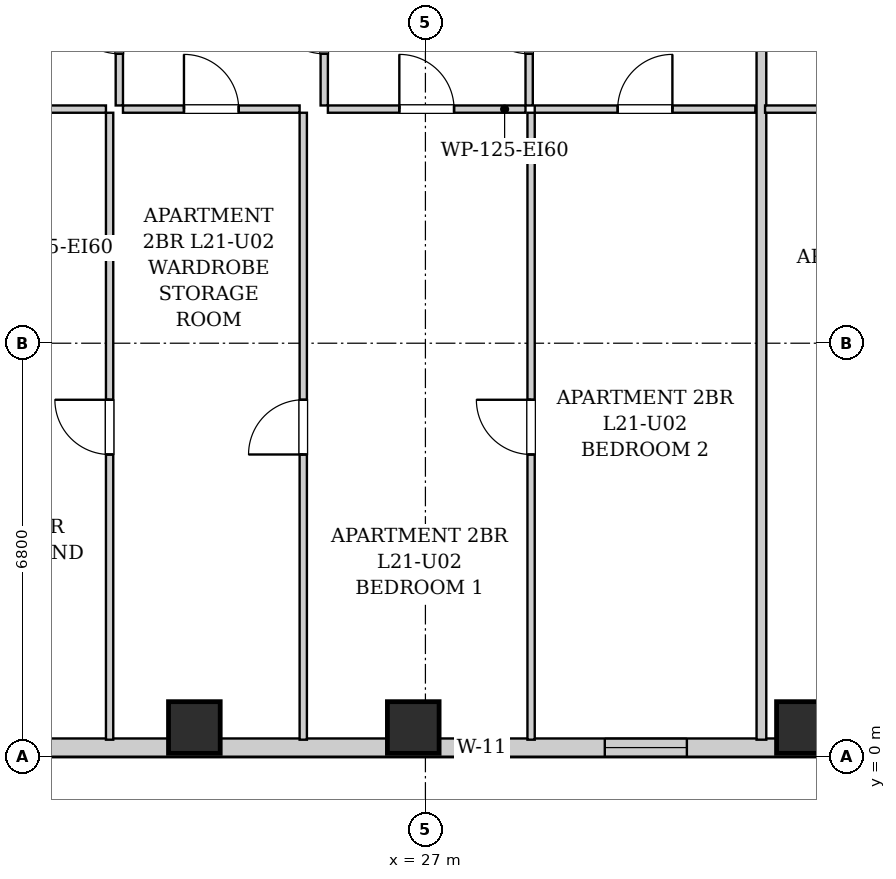
"""IFC4 building model, lengths in metres.
Left out: names, types, materials, properties, quantities, classifications, styles, units other than length and angle.
Written with IfcOpenShell. Run it as: python <this file> out.ifc"""

import sys

from ifc_helpers import new_model, si_unit, direction, frame, frame_2d, origin, origin_2d, place, context, subcontext, project, spatial, rectangle, extrude, element, fill, save


model = new_model("IFC4")
c1 = context("Model", 3, precision=1e-05, world=origin(), true_north=direction((0.0, 1.0)))
c2 = subcontext(c1, "Body", "Model", "MODEL_VIEW")
j1 = project(units=[si_unit("LENGTHUNIT", "METRE"), si_unit("PLANEANGLEUNIT", "RADIAN")], contexts=[c1])
p1 = place(None, origin())
s1 = spatial("IfcSite", under=j1, at=p1, CompositionType="ELEMENT")
p2 = place(p1, origin())
s2 = spatial("IfcBuilding", under=s1, at=p2, CompositionType="ELEMENT")
p3 = place(p2, frame((0.0, 0.0, 78.3)))
s3 = spatial("IfcBuildingStorey", under=s2, at=p3, CompositionType="ELEMENT", Elevation=78.3)
for number, where, z_axis, x_axis in (
    (1, (23.2, 0.48, 0.0), (0.0, 0.0, 1.0), (1.0, 0.0, 0.0)),
    (2, (26.8, 0.48, 0.0), (0.0, 0.0, 1.0), (1.0, 0.0, 0.0)),
    (3, (33.2, 0.48, 0.0), (0.0, 0.0, 1.0), (1.0, 0.0, 0.0)),
):
    element("IfcColumn", number, at=place(p3, frame(where, z_axis=z_axis, x_axis=x_axis)), inside=s3, PredefinedType="COLUMN", context=c2, shape_type="SweptSolid", body=[
        extrude(rectangle(XDim=0.85, YDim=0.85, at=origin_2d()), origin(), (0.0, 0.0, 1.0), 3.2),
    ])
p4 = place(p3, frame((40.9, 0.15, 0.0), z_axis=(0.0, 0.0, 1.0), x_axis=(-1.0, 0.0, 0.0)))
e4 = element("IfcWall", 4, at=p4, inside=s3, PredefinedType="SOLIDWALL", context=c2, shape_type="SweptSolid", body=[
    extrude(rectangle(XDim=23.7, YDim=0.3, at=frame_2d((11.85, 0.0))), origin(), (0.0, 0.0, 1.0), 2.94),
])
p5 = place(p4, frame((20.625, 0.0, 0.55)))
e5 = element("IfcOpeningElement", 5, at=p5, cuts=e4, PredefinedType="OPENING", context=c2, shape_type="SweptSolid", body=[
    extrude(rectangle(XDim=1.35, YDim=1.2, at=frame_2d((0.675, 0.6))), frame((0.0, 0.16, 0.0), z_axis=(0.0, -1.0, 0.0), x_axis=(1.0, 0.0, 0.0)), (0.0, 0.0, 1.0), 0.32),
])
p6 = place(p4, frame((12.55, 0.0, 0.55)))
e6 = element("IfcOpeningElement", 6, at=p6, cuts=e4, PredefinedType="OPENING", context=c2, shape_type="SweptSolid", body=[
    extrude(rectangle(XDim=0.85, YDim=1.2, at=frame_2d((0.425, 0.6))), frame((0.0, 0.16, 0.0), z_axis=(0.0, -1.0, 0.0), x_axis=(1.0, 0.0, 0.0)), (0.0, 0.0, 1.0), 0.32),
])
p7 = place(p4, frame((9.6, 0.0, 0.55)))
e7 = element("IfcOpeningElement", 7, at=p7, cuts=e4, PredefinedType="OPENING", context=c2, shape_type="SweptSolid", body=[
    extrude(rectangle(XDim=1.35, YDim=1.2, at=frame_2d((0.675, 0.6))), frame((0.0, 0.16, 0.0), z_axis=(0.0, -1.0, 0.0), x_axis=(1.0, 0.0, 0.0)), (0.0, 0.0, 1.0), 0.32),
])
p8 = place(p4, frame((5.765, 0.0, 0.55)))
e8 = element("IfcOpeningElement", 8, at=p8, cuts=e4, PredefinedType="OPENING", context=c2, shape_type="SweptSolid", body=[
    extrude(rectangle(XDim=1.35, YDim=1.2, at=frame_2d((0.675, 0.6))), frame((0.0, 0.16, 0.0), z_axis=(0.0, -1.0, 0.0), x_axis=(1.0, 0.0, 0.0)), (0.0, 0.0, 1.0), 0.32),
])
p9 = place(p4, frame((2.1, 0.0, 0.55)))
e9 = element("IfcOpeningElement", 9, at=p9, cuts=e4, PredefinedType="OPENING", context=c2, shape_type="SweptSolid", body=[
    extrude(rectangle(XDim=1.35, YDim=1.2, at=frame_2d((0.675, 0.6))), frame((0.0, 0.16, 0.0), z_axis=(0.0, -1.0, 0.0), x_axis=(1.0, 0.0, 0.0)), (0.0, 0.0, 1.0), 0.32),
])
p10 = place(p3, frame((21.966, 10.71, 0.0), z_axis=(0.0, 0.0, 1.0), x_axis=(0.0, 1.0, 0.0)))
e10 = element("IfcWall", 10, at=p10, inside=s3, PredefinedType="PARTITIONING", context=c2, shape_type="SweptSolid", body=[
    extrude(rectangle(XDim=2.6, YDim=0.12, at=frame_2d((1.3, 0.0))), origin(), (0.0, 0.0, 1.0), 2.94),
])
p11 = place(p10, frame((0.85, 0.0, 0.0)))
e11 = element("IfcOpeningElement", 11, at=p11, cuts=e10, PredefinedType="OPENING", context=c2, shape_type="SweptSolid", body=[
    extrude(rectangle(XDim=0.9, YDim=2.05, at=frame_2d((0.45, 1.025))), frame((0.0, 0.07, 0.0), z_axis=(0.0, -1.0, 0.0), x_axis=(1.0, 0.0, 0.0)), (0.0, 0.0, 1.0), 0.14),
])
p12 = place(p3, frame((17.466, 10.65, 0.0), z_axis=(0.0, 0.0, 1.0), x_axis=(1.0, 0.0, 0.0)))
e12 = element("IfcWall", 12, at=p12, inside=s3, PredefinedType="PARTITIONING", context=c2, shape_type="SweptSolid", body=[
    extrude(rectangle(XDim=4.28, YDim=0.12, at=frame_2d((2.14, 0.0))), origin(), (0.0, 0.0, 1.0), 2.94),
])
p13 = place(p12, frame((1.69, 0.0, 0.0)))
e13 = element("IfcOpeningElement", 13, at=p13, cuts=e12, PredefinedType="OPENING", context=c2, shape_type="SweptSolid", body=[
    extrude(rectangle(XDim=0.9, YDim=2.05, at=frame_2d((0.45, 1.025))), frame((0.0, 0.07, 0.0), z_axis=(0.0, -1.0, 0.0), x_axis=(1.0, 0.0, 0.0)), (0.0, 0.0, 1.0), 0.14),
])
p14 = place(p3, frame((25.336, 10.71, 0.0), z_axis=(0.0, 0.0, 1.0), x_axis=(0.0, 1.0, 0.0)))
e14 = element("IfcWall", 14, at=p14, inside=s3, PredefinedType="PARTITIONING", context=c2, shape_type="SweptSolid", body=[
    extrude(rectangle(XDim=2.6, YDim=0.12, at=frame_2d((1.3, 0.0))), origin(), (0.0, 0.0, 1.0), 2.94),
])
p15 = place(p14, frame((0.85, 0.0, 0.0)))
e15 = element("IfcOpeningElement", 15, at=p15, cuts=e14, PredefinedType="OPENING", context=c2, shape_type="SweptSolid", body=[
    extrude(rectangle(XDim=0.9, YDim=2.05, at=frame_2d((0.45, 1.025))), frame((0.0, 0.07, 0.0), z_axis=(0.0, -1.0, 0.0), x_axis=(1.0, 0.0, 0.0)), (0.0, 0.0, 1.0), 0.14),
])
p16 = place(p3, frame((22.026, 10.65, 0.0), z_axis=(0.0, 0.0, 1.0), x_axis=(1.0, 0.0, 0.0)))
e16 = element("IfcWall", 16, at=p16, inside=s3, PredefinedType="PARTITIONING", context=c2, shape_type="SweptSolid", body=[
    extrude(rectangle(XDim=2.905, YDim=0.12, at=frame_2d((1.453, 0.0))), origin(), (0.0, 0.0, 1.0), 2.94),
])
p17 = place(p16, frame((1.003, 0.0, 0.0)))
e17 = element("IfcOpeningElement", 17, at=p17, cuts=e16, PredefinedType="OPENING", context=c2, shape_type="SweptSolid", body=[
    extrude(rectangle(XDim=0.9, YDim=2.05, at=frame_2d((0.45, 1.025))), frame((0.0, 0.07, 0.0), z_axis=(0.0, -1.0, 0.0), x_axis=(1.0, 0.0, 0.0)), (0.0, 0.0, 1.0), 0.14),
])
p18 = place(p3, frame((28.706, 10.71, 0.0), z_axis=(0.0, 0.0, 1.0), x_axis=(0.0, 1.0, 0.0)))
e18 = element("IfcWall", 18, at=p18, inside=s3, PredefinedType="PARTITIONING", context=c2, shape_type="SweptSolid", body=[
    extrude(rectangle(XDim=2.6, YDim=0.12, at=frame_2d((1.3, 0.0))), origin(), (0.0, 0.0, 1.0), 2.94),
])
p19 = place(p18, frame((0.85, 0.0, 0.0)))
e19 = element("IfcOpeningElement", 19, at=p19, cuts=e18, PredefinedType="OPENING", context=c2, shape_type="SweptSolid", body=[
    extrude(rectangle(XDim=0.9, YDim=2.05, at=frame_2d((0.45, 1.025))), frame((0.0, 0.07, 0.0), z_axis=(0.0, -1.0, 0.0), x_axis=(1.0, 0.0, 0.0)), (0.0, 0.0, 1.0), 0.14),
])
p20 = place(p3, frame((25.396, 10.65, 0.0), z_axis=(0.0, 0.0, 1.0), x_axis=(1.0, 0.0, 0.0)))
e20 = element("IfcWall", 20, at=p20, inside=s3, PredefinedType="PARTITIONING", context=c2, shape_type="SweptSolid", body=[
    extrude(rectangle(XDim=3.25, YDim=0.12, at=frame_2d((1.625, 0.0))), origin(), (0.0, 0.0, 1.0), 2.94),
])
p21 = place(p20, frame((1.175, 0.0, 0.0)))
e21 = element("IfcOpeningElement", 21, at=p21, cuts=e20, PredefinedType="OPENING", context=c2, shape_type="SweptSolid", body=[
    extrude(rectangle(XDim=0.9, YDim=2.05, at=frame_2d((0.45, 1.025))), frame((0.0, 0.07, 0.0), z_axis=(0.0, -1.0, 0.0), x_axis=(1.0, 0.0, 0.0)), (0.0, 0.0, 1.0), 0.14),
])
p22 = place(p3, frame((28.798, 10.65, 0.0), z_axis=(0.0, 0.0, 1.0), x_axis=(1.0, 0.0, 0.0)))
e22 = element("IfcWall", 22, at=p22, inside=s3, PredefinedType="PARTITIONING", context=c2, shape_type="SweptSolid", body=[
    extrude(rectangle(XDim=3.628, YDim=0.12, at=frame_2d((1.814, 0.0))), origin(), (0.0, 0.0, 1.0), 2.94),
])
p23 = place(p22, frame((1.364, 0.0, 0.0)))
e23 = element("IfcOpeningElement", 23, at=p23, cuts=e22, PredefinedType="OPENING", context=c2, shape_type="SweptSolid", body=[
    extrude(rectangle(XDim=0.9, YDim=2.05, at=frame_2d((0.45, 1.025))), frame((0.0, 0.07, 0.0), z_axis=(0.0, -1.0, 0.0), x_axis=(1.0, 0.0, 0.0)), (0.0, 0.0, 1.0), 0.14),
])
p24 = place(p3, frame((21.806, 0.28, 0.0), z_axis=(0.0, 0.0, 1.0), x_axis=(0.0, 1.0, 0.0)))
e24 = element("IfcWall", 24, at=p24, inside=s3, PredefinedType="PARTITIONING", context=c2, shape_type="SweptSolid", body=[
    extrude(rectangle(XDim=10.31, YDim=0.12, at=frame_2d((5.155, 0.0))), origin(), (0.0, 0.0, 1.0), 2.94),
])
p25 = place(p24, frame((4.69, 0.0, 0.0)))
e25 = element("IfcOpeningElement", 25, at=p25, cuts=e24, PredefinedType="OPENING", context=c2, shape_type="SweptSolid", body=[
    extrude(rectangle(XDim=0.9, YDim=2.05, at=frame_2d((0.45, 1.025))), frame((0.0, 0.07, 0.0), z_axis=(0.0, -1.0, 0.0), x_axis=(1.0, 0.0, 0.0)), (0.0, 0.0, 1.0), 0.14),
])
p26 = place(p3, frame((24.991, 0.28, 0.0), z_axis=(0.0, 0.0, 1.0), x_axis=(0.0, 1.0, 0.0)))
e26 = element("IfcWall", 26, at=p26, inside=s3, PredefinedType="PARTITIONING", context=c2, shape_type="SweptSolid", body=[
    extrude(rectangle(XDim=10.31, YDim=0.12, at=frame_2d((5.155, 0.0))), origin(), (0.0, 0.0, 1.0), 2.94),
])
p27 = place(p26, frame((4.69, 0.0, 0.0)))
e27 = element("IfcOpeningElement", 27, at=p27, cuts=e26, PredefinedType="OPENING", context=c2, shape_type="SweptSolid", body=[
    extrude(rectangle(XDim=0.9, YDim=2.05, at=frame_2d((0.45, 1.025))), frame((0.0, 0.07, 0.0), z_axis=(0.0, -1.0, 0.0), x_axis=(1.0, 0.0, 0.0)), (0.0, 0.0, 1.0), 0.14),
])
p28 = place(p3, frame((28.738, 0.28, 0.0), z_axis=(0.0, 0.0, 1.0), x_axis=(0.0, 1.0, 0.0)))
e28 = element("IfcWall", 28, at=p28, inside=s3, PredefinedType="PARTITIONING", context=c2, shape_type="SweptSolid", body=[
    extrude(rectangle(XDim=10.31, YDim=0.12, at=frame_2d((5.155, 0.0))), origin(), (0.0, 0.0, 1.0), 2.94),
])
p29 = place(p28, frame((4.69, 0.0, 0.0)))
e29 = element("IfcOpeningElement", 29, at=p29, cuts=e28, PredefinedType="OPENING", context=c2, shape_type="SweptSolid", body=[
    extrude(rectangle(XDim=0.9, YDim=2.05, at=frame_2d((0.45, 1.025))), frame((0.0, 0.07, 0.0), z_axis=(0.0, -1.0, 0.0), x_axis=(1.0, 0.0, 0.0)), (0.0, 0.0, 1.0), 0.14),
])
p30 = place(p3, frame((32.526, 0.28, 0.0), z_axis=(0.0, 0.0, 1.0), x_axis=(0.0, 1.0, 0.0)))
e30 = element("IfcWall", 30, at=p30, inside=s3, PredefinedType="PARTITIONING", context=c2, shape_type="SweptSolid", body=[
    extrude(rectangle(XDim=13.03, YDim=0.16, at=frame_2d((6.515, 0.0))), origin(), (0.0, 0.0, 1.0), 2.94),
])
p31 = place(p3, frame((32.586, 10.65, 0.0), z_axis=(0.0, 0.0, 1.0), x_axis=(1.0, 0.0, 0.0)))
e31 = element("IfcWall", 31, at=p31, inside=s3, PredefinedType="PARTITIONING", context=c2, shape_type="SweptSolid", body=[
    extrude(rectangle(XDim=2.4, YDim=0.12, at=frame_2d((1.2, 0.0))), origin(), (0.0, 0.0, 1.0), 2.94),
])
p32 = place(p11, origin())
e32 = element("IfcDoor", 32, at=p32, inside=s3, OperationType="SINGLE_SWING_RIGHT", PredefinedType="DOOR", context=c2, shape_type="SweptSolid", body=[
    extrude(rectangle(XDim=0.9, YDim=2.05, at=frame_2d((0.45, 1.025))), frame((0.0, 0.025, 0.0), z_axis=(0.0, -1.0, 0.0), x_axis=(1.0, 0.0, 0.0)), (0.0, 0.0, 1.0), 0.05),
])
fill(e11, e32)
p33 = place(p15, origin())
e33 = element("IfcDoor", 33, at=p33, inside=s3, OperationType="SINGLE_SWING_RIGHT", PredefinedType="DOOR", context=c2, shape_type="SweptSolid", body=[
    extrude(rectangle(XDim=0.9, YDim=2.05, at=frame_2d((0.45, 1.025))), frame((0.0, 0.025, 0.0), z_axis=(0.0, -1.0, 0.0), x_axis=(1.0, 0.0, 0.0)), (0.0, 0.0, 1.0), 0.05),
])
fill(e15, e33)
p34 = place(p17, origin())
e34 = element("IfcDoor", 34, at=p34, inside=s3, OperationType="SINGLE_SWING_LEFT", PredefinedType="DOOR", context=c2, shape_type="SweptSolid", body=[
    extrude(rectangle(XDim=0.9, YDim=2.05, at=frame_2d((0.45, 1.025))), frame((0.0, 0.025, 0.0), z_axis=(0.0, -1.0, 0.0), x_axis=(1.0, 0.0, 0.0)), (0.0, 0.0, 1.0), 0.05),
])
fill(e17, e34)
p35 = place(p19, origin())
e35 = element("IfcDoor", 35, at=p35, inside=s3, OperationType="SINGLE_SWING_RIGHT", PredefinedType="DOOR", context=c2, shape_type="SweptSolid", body=[
    extrude(rectangle(XDim=0.9, YDim=2.05, at=frame_2d((0.45, 1.025))), frame((0.0, 0.025, 0.0), z_axis=(0.0, -1.0, 0.0), x_axis=(1.0, 0.0, 0.0)), (0.0, 0.0, 1.0), 0.05),
])
fill(e19, e35)
p36 = place(p21, origin())
e36 = element("IfcDoor", 36, at=p36, inside=s3, OperationType="SINGLE_SWING_LEFT", PredefinedType="DOOR", context=c2, shape_type="SweptSolid", body=[
    extrude(rectangle(XDim=0.9, YDim=2.05, at=frame_2d((0.45, 1.025))), frame((0.0, 0.025, 0.0), z_axis=(0.0, -1.0, 0.0), x_axis=(1.0, 0.0, 0.0)), (0.0, 0.0, 1.0), 0.05),
])
fill(e21, e36)
p37 = place(p23, origin())
e37 = element("IfcDoor", 37, at=p37, inside=s3, OperationType="SINGLE_SWING_RIGHT", PredefinedType="DOOR", context=c2, shape_type="SweptSolid", body=[
    extrude(rectangle(XDim=0.9, YDim=2.05, at=frame_2d((0.45, 1.025))), frame((0.0, 0.025, 0.0), z_axis=(0.0, -1.0, 0.0), x_axis=(1.0, 0.0, 0.0)), (0.0, 0.0, 1.0), 0.05),
])
fill(e23, e37)
p38 = place(p25, origin())
e38 = element("IfcDoor", 38, at=p38, inside=s3, OperationType="SINGLE_SWING_RIGHT", PredefinedType="DOOR", context=c2, shape_type="SweptSolid", body=[
    extrude(rectangle(XDim=0.9, YDim=2.05, at=frame_2d((0.45, 1.025))), frame((0.0, 0.025, 0.0), z_axis=(0.0, -1.0, 0.0), x_axis=(1.0, 0.0, 0.0)), (0.0, 0.0, 1.0), 0.05),
])
fill(e25, e38)
p39 = place(p27, origin())
e39 = element("IfcDoor", 39, at=p39, inside=s3, OperationType="SINGLE_SWING_LEFT", PredefinedType="DOOR", context=c2, shape_type="SweptSolid", body=[
    extrude(rectangle(XDim=0.9, YDim=2.05, at=frame_2d((0.45, 1.025))), frame((0.0, 0.025, 0.0), z_axis=(0.0, -1.0, 0.0), x_axis=(1.0, 0.0, 0.0)), (0.0, 0.0, 1.0), 0.05),
])
fill(e27, e39)
p40 = place(p29, origin())
e40 = element("IfcDoor", 40, at=p40, inside=s3, OperationType="SINGLE_SWING_RIGHT", PredefinedType="DOOR", context=c2, shape_type="SweptSolid", body=[
    extrude(rectangle(XDim=0.9, YDim=2.05, at=frame_2d((0.45, 1.025))), frame((0.0, 0.025, 0.0), z_axis=(0.0, -1.0, 0.0), x_axis=(1.0, 0.0, 0.0)), (0.0, 0.0, 1.0), 0.05),
])
fill(e29, e40)
p41 = place(p6, origin())
e41 = element("IfcWindow", 41, at=p41, inside=s3, PartitioningType="SINGLE_PANEL", PredefinedType="WINDOW", context=c2, shape_type="SweptSolid", body=[
    extrude(rectangle(XDim=0.85, YDim=1.2, at=frame_2d((0.425, 0.6))), frame((0.0, 0.03, 0.0), z_axis=(0.0, -1.0, 0.0), x_axis=(1.0, 0.0, 0.0)), (0.0, 0.0, 1.0), 0.06),
])
fill(e6, e41)
p42 = place(p7, origin())
e42 = element("IfcWindow", 42, at=p42, inside=s3, PartitioningType="SINGLE_PANEL", PredefinedType="WINDOW", context=c2, shape_type="SweptSolid", body=[
    extrude(rectangle(XDim=1.35, YDim=1.2, at=frame_2d((0.675, 0.6))), frame((0.0, 0.03, 0.0), z_axis=(0.0, -1.0, 0.0), x_axis=(1.0, 0.0, 0.0)), (0.0, 0.0, 1.0), 0.06),
])
fill(e7, e42)
save(model, sys.argv[1])
